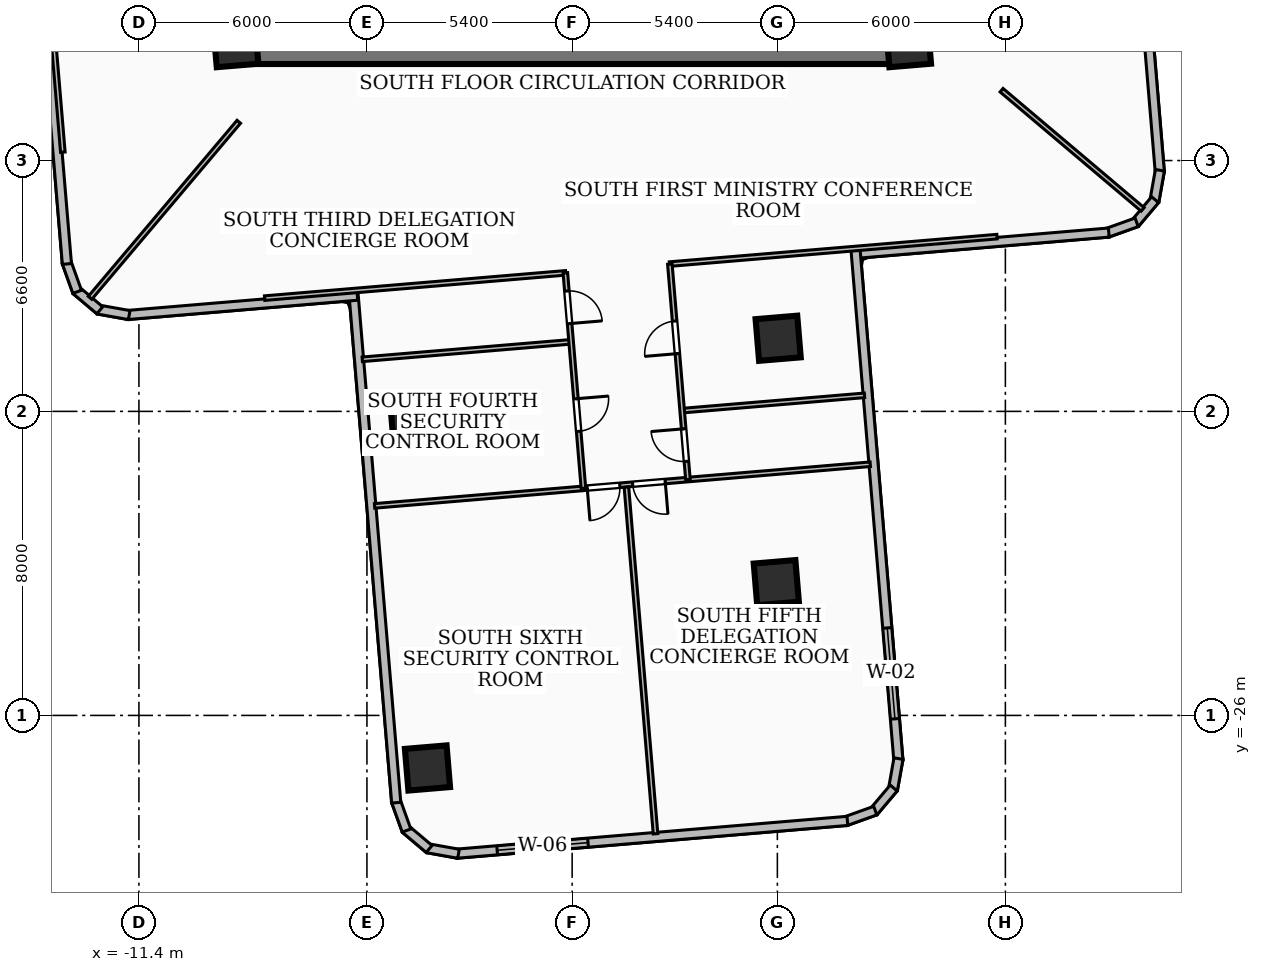
"""IFC4 building model, lengths in metres.
Left out: names, types, materials, properties, quantities, classifications, styles, units other than length and angle.
Written with IfcOpenShell. Run it as: python <this file> out.ifc"""

import sys

from ifc_helpers import new_model, si_unit, direction, frame, frame_2d, origin, origin_2d, place, context, subcontext, project, spatial, rectangle, extrude, element, fill, save


model = new_model("IFC4")
c1 = context("Model", 3, precision=1e-05, world=origin(), true_north=direction((0.0, 1.0)))
c2 = subcontext(c1, "Body", "Model", "MODEL_VIEW")
j1 = project(units=[si_unit("LENGTHUNIT", "METRE"), si_unit("PLANEANGLEUNIT", "RADIAN")], contexts=[c1])
p1 = place(None, origin())
s1 = spatial("IfcSite", under=j1, at=p1, CompositionType="ELEMENT")
p2 = place(p1, origin())
s2 = spatial("IfcBuilding", under=s1, at=p2, CompositionType="ELEMENT")
p3 = place(p2, frame((0.0, 0.0, 64.08)))
s3 = spatial("IfcBuildingStorey", under=s2, at=p3, CompositionType="ELEMENT", Elevation=64.08)
p4 = place(p3, frame((8.78, -8.585, 0.0), z_axis=(0.0, 0.0, 1.0), x_axis=(-1.0, 0.0, 0.0)))
e1 = element("IfcWall", 1, at=p4, inside=s3, PredefinedType="SHEAR", context=c2, shape_type="SweptSolid", body=[
    extrude(rectangle(XDim=17.56, YDim=0.55, at=frame_2d((8.78, 0.0))), origin(), (0.0, 0.0, 1.0), 3.34),
])
for number, where, z_axis, x_axis in (
    (2, (8.85, -8.35, 0.0), (0.0, 0.0, 1.0), (0.996, 0.084, 0.0)),
    (3, (-8.85, -8.35, 0.0), (0.0, 0.0, 1.0), (0.996, 0.084, 0.0)),
    (4, (-4.184, -18.391, 0.0), (0.0, 0.0, 1.0), (0.996, 0.084, 0.0)),
    (5, (5.421, -16.076, 0.0), (0.0, 0.0, 1.0), (0.996, 0.084, 0.0)),
    (6, (-3.807, -27.383, 0.0), (0.0, 0.0, 1.0), (0.996, 0.084, 0.0)),
    (7, (5.372, -22.507, 0.0), (0.0, 0.0, 1.0), (0.996, 0.084, 0.0)),
):
    element("IfcColumn", number, at=place(p3, frame(where, z_axis=z_axis, x_axis=x_axis)), inside=s3, PredefinedType="COLUMN", context=c2, shape_type="SweptSolid", body=[
        extrude(rectangle(XDim=1.1, YDim=1.1, at=origin_2d()), origin(), (0.0, 0.0, 1.0), 3.6),
    ])
p5 = place(p3, frame((14.956, -5.652, 0.0), z_axis=(0.0, 0.0, 1.0), x_axis=(0.083627472659, -0.996497087711, 0.0)))
e8 = element("IfcWall", 8, at=p5, inside=s3, PredefinedType="SOLIDWALL", context=c2, shape_type="SweptSolid", body=[
    extrude(rectangle(XDim=6.075, YDim=0.24, at=frame_2d((3.038, 0.0))), origin(), (0.0, 0.0, 1.0), 3.34),
])
p6 = place(p3, frame((15.466, -11.656, 0.0), z_axis=(0.0, 0.0, 1.0), x_axis=(-0.175678791378, -0.98444754165, 0.0)))
e9 = element("IfcWall", 9, at=p6, inside=s3, PredefinedType="SOLIDWALL", context=c2, shape_type="SweptSolid", body=[
    extrude(rectangle(XDim=0.831, YDim=0.24, at=frame_2d((0.416, 0.0))), origin(), (0.0, 0.0, 1.0), 3.34),
])
p7 = place(p3, frame((15.34, -12.43, 0.0), z_axis=(0.0, 0.0, 1.0), x_axis=(-0.645767595037, -0.763534028842, 0.0)))
e10 = element("IfcWall", 10, at=p7, inside=s3, PredefinedType="SOLIDWALL", context=c2, shape_type="SweptSolid", body=[
    extrude(rectangle(XDim=0.815, YDim=0.24, at=frame_2d((0.407, 0.0))), origin(), (0.0, 0.0, 1.0), 3.34),
])
p8 = place(p3, frame((14.854, -13.025, 0.0), z_axis=(0.0, 0.0, 1.0), x_axis=(-0.941455621898, -0.337136933599, 0.0)))
e11 = element("IfcWall", 11, at=p8, inside=s3, PredefinedType="SOLIDWALL", context=c2, shape_type="SweptSolid", body=[
    extrude(rectangle(XDim=0.831, YDim=0.24, at=frame_2d((0.415, 0.0))), origin(), (0.0, 0.0, 1.0), 3.34),
])
p9 = place(p3, frame((14.121, -13.295, 0.0), z_axis=(0.0, 0.0, 1.0), x_axis=(-0.99648986367, -0.083713509088, 0.0)))
e12 = element("IfcWall", 12, at=p9, inside=s3, PredefinedType="SOLIDWALL", context=c2, shape_type="SweptSolid", body=[
    extrude(rectangle(XDim=6.775, YDim=0.24, at=frame_2d((3.387, 0.0))), origin(), (0.0, 0.0, 1.0), 3.34),
])
p10 = place(p3, frame((7.458, -13.758, 0.0), z_axis=(0.0, 0.0, 1.0), x_axis=(0.083631732273, -0.996496730229, 0.0)))
e13 = element("IfcWall", 13, at=p10, inside=s3, PredefinedType="SOLIDWALL", context=c2, shape_type="SweptSolid", body=[
    extrude(rectangle(XDim=13.475, YDim=0.24, at=frame_2d((6.738, 0.0))), origin(), (0.0, 0.0, 1.0), 3.34),
])
p11 = place(p10, frame((9.975, 0.0, 0.85)))
e14 = element("IfcOpeningElement", 14, at=p11, cuts=e13, PredefinedType="OPENING", context=c2, shape_type="SweptSolid", body=[
    extrude(rectangle(XDim=2.4, YDim=2.1, at=frame_2d((1.2, 1.05))), frame((0.0, 0.13, 0.0), z_axis=(0.0, -1.0, 0.0), x_axis=(1.0, 0.0, 0.0)), (0.0, 0.0, 1.0), 0.26),
])
p12 = place(p3, frame((8.587, -27.136, 0.0), z_axis=(0.0, 0.0, 1.0), x_axis=(-0.175678791378, -0.98444754165, 0.0)))
e15 = element("IfcWall", 15, at=p12, inside=s3, PredefinedType="SOLIDWALL", context=c2, shape_type="SweptSolid", body=[
    extrude(rectangle(XDim=0.831, YDim=0.24, at=frame_2d((0.416, 0.0))), origin(), (0.0, 0.0, 1.0), 3.34),
])
p13 = place(p3, frame((8.461, -27.91, 0.0), z_axis=(0.0, 0.0, 1.0), x_axis=(-0.644892840611, -0.764273003664, 0.0)))
e16 = element("IfcWall", 16, at=p13, inside=s3, PredefinedType="SOLIDWALL", context=c2, shape_type="SweptSolid", body=[
    extrude(rectangle(XDim=0.814, YDim=0.24, at=frame_2d((0.407, 0.0))), origin(), (0.0, 0.0, 1.0), 3.34),
])
p14 = place(p3, frame((7.976, -28.505, 0.0), z_axis=(0.0, 0.0, 1.0), x_axis=(-0.941455621898, -0.337136933599, 0.0)))
e17 = element("IfcWall", 17, at=p14, inside=s3, PredefinedType="SOLIDWALL", context=c2, shape_type="SweptSolid", body=[
    extrude(rectangle(XDim=0.831, YDim=0.24, at=frame_2d((0.415, 0.0))), origin(), (0.0, 0.0, 1.0), 3.34),
])
p15 = place(p3, frame((7.243, -28.775, 0.0), z_axis=(0.0, 0.0, 1.0), x_axis=(-0.996496471002, -0.083634820983, 0.0)))
e18 = element("IfcWall", 18, at=p15, inside=s3, PredefinedType="SOLIDWALL", context=c2, shape_type="SweptSolid", body=[
    extrude(rectangle(XDim=10.319, YDim=0.24, at=frame_2d((5.16, 0.0))), origin(), (0.0, 0.0, 1.0), 3.34),
])
p16 = place(p15, frame((6.849, 0.0, 0.85)))
e19 = element("IfcOpeningElement", 19, at=p16, cuts=e18, PredefinedType="OPENING", context=c2, shape_type="SweptSolid", body=[
    extrude(rectangle(XDim=2.4, YDim=1.85, at=frame_2d((1.2, 0.925))), frame((0.0, 0.13, 0.0), z_axis=(0.0, -1.0, 0.0), x_axis=(1.0, 0.0, 0.0)), (0.0, 0.0, 1.0), 0.26),
])
p17 = place(p3, frame((-2.99, -29.64, 0.0), z_axis=(0.0, 0.0, 1.0), x_axis=(-0.98444754165, 0.175678791378, 0.0)))
e20 = element("IfcWall", 20, at=p17, inside=s3, PredefinedType="SOLIDWALL", context=c2, shape_type="SweptSolid", body=[
    extrude(rectangle(XDim=0.831, YDim=0.24, at=frame_2d((0.416, 0.0))), origin(), (0.0, 0.0, 1.0), 3.34),
])
p18 = place(p3, frame((-3.764, -29.514, 0.0), z_axis=(0.0, 0.0, 1.0), x_axis=(-0.763773335426, 0.645484540553, 0.0)))
e21 = element("IfcWall", 21, at=p18, inside=s3, PredefinedType="SOLIDWALL", context=c2, shape_type="SweptSolid", body=[
    extrude(rectangle(XDim=0.813, YDim=0.24, at=frame_2d((0.407, 0.0))), origin(), (0.0, 0.0, 1.0), 3.34),
])
p19 = place(p3, frame((-4.358, -29.029, 0.0), z_axis=(0.0, 0.0, 1.0), x_axis=(-0.338178397423, 0.941082021673, 0.0)))
e22 = element("IfcWall", 22, at=p19, inside=s3, PredefinedType="SOLIDWALL", context=c2, shape_type="SweptSolid", body=[
    extrude(rectangle(XDim=0.831, YDim=0.24, at=frame_2d((0.416, 0.0))), origin(), (0.0, 0.0, 1.0), 3.34),
])
p20 = place(p3, frame((-4.629, -28.296, 0.0), z_axis=(0.0, 0.0, 1.0), x_axis=(-0.083649723304, 0.996495220155, 0.0)))
e23 = element("IfcWall", 23, at=p20, inside=s3, PredefinedType="SOLIDWALL", context=c2, shape_type="SweptSolid", body=[
    extrude(rectangle(XDim=13.475, YDim=0.24, at=frame_2d((6.738, 0.0))), origin(), (0.0, 0.0, 1.0), 2.152),
])
p21 = place(p3, frame((-5.652, -14.956, 0.0), z_axis=(0.0, 0.0, 1.0), x_axis=(-0.996497087711, -0.083627472659, 0.0)))
e24 = element("IfcWall", 24, at=p21, inside=s3, PredefinedType="SOLIDWALL", context=c2, shape_type="SweptSolid", body=[
    extrude(rectangle(XDim=6.075, YDim=0.24, at=frame_2d((3.038, 0.0))), origin(), (0.0, 0.0, 1.0), 2.072),
])
p22 = place(p3, frame((-11.656, -15.466, 0.0), z_axis=(0.0, 0.0, 1.0), x_axis=(-0.98444754165, 0.175678791378, 0.0)))
e25 = element("IfcWall", 25, at=p22, inside=s3, PredefinedType="SOLIDWALL", context=c2, shape_type="SweptSolid", body=[
    extrude(rectangle(XDim=0.831, YDim=0.24, at=frame_2d((0.416, 0.0))), origin(), (0.0, 0.0, 1.0), 3.34),
])
p23 = place(p3, frame((-12.43, -15.34, 0.0), z_axis=(0.0, 0.0, 1.0), x_axis=(-0.763534028842, 0.645767595037, 0.0)))
e26 = element("IfcWall", 26, at=p23, inside=s3, PredefinedType="SOLIDWALL", context=c2, shape_type="SweptSolid", body=[
    extrude(rectangle(XDim=0.815, YDim=0.24, at=frame_2d((0.407, 0.0))), origin(), (0.0, 0.0, 1.0), 3.34),
])
p24 = place(p3, frame((-13.025, -14.854, 0.0), z_axis=(0.0, 0.0, 1.0), x_axis=(-0.337136933599, 0.941455621898, 0.0)))
e27 = element("IfcWall", 27, at=p24, inside=s3, PredefinedType="SOLIDWALL", context=c2, shape_type="SweptSolid", body=[
    extrude(rectangle(XDim=0.831, YDim=0.24, at=frame_2d((0.415, 0.0))), origin(), (0.0, 0.0, 1.0), 3.34),
])
p25 = place(p3, frame((-13.295, -14.121, 0.0), z_axis=(0.0, 0.0, 1.0), x_axis=(-0.083713509088, 0.99648986367, 0.0)))
e28 = element("IfcWall", 28, at=p25, inside=s3, PredefinedType="SOLIDWALL", context=c2, shape_type="SweptSolid", body=[
    extrude(rectangle(XDim=6.775, YDim=0.24, at=frame_2d((3.387, 0.0))), origin(), (0.0, 0.0, 1.0), 2.072),
])
p26 = place(p3, frame((-8.772, -10.38, 0.0), z_axis=(0.0, 0.0, 1.0), x_axis=(-0.645424146464, -0.763824371935, 0.0)))
e29 = element("IfcWall", 29, at=p26, inside=s3, PredefinedType="PARTITIONING", context=c2, shape_type="SweptSolid", body=[
    extrude(rectangle(XDim=6.064, YDim=0.12, at=frame_2d((3.032, 0.0))), origin(), (0.0, 0.0, 1.0), 2.072),
])
p27 = place(p3, frame((11.3, -9.549, 0.0), z_axis=(0.0, 0.0, 1.0), x_axis=(0.763780578352, -0.645475970221, 0.0)))
e30 = element("IfcWall", 30, at=p27, inside=s3, PredefinedType="PARTITIONING", context=c2, shape_type="SweptSolid", body=[
    extrude(rectangle(XDim=4.86, YDim=0.12, at=frame_2d((2.43, 0.0))), origin(), (0.0, 0.0, 1.0), 3.34),
])
p28 = place(p3, frame((-14.125, -2.561, 0.0), z_axis=(0.0, 0.0, 1.0), x_axis=(0.083580419953, -0.996501035323, 0.0)))
e31 = element("IfcWall", 31, at=p28, inside=s3, PredefinedType="PARTITIONING", context=c2, shape_type="SweptSolid", body=[
    extrude(rectangle(XDim=8.649, YDim=0.12, at=frame_2d((4.325, 0.0))), origin(), (0.0, 0.0, 1.0), 2.072),
])
p29 = place(p3, frame((2.561, -14.125, 0.0), z_axis=(0.0, 0.0, 1.0), x_axis=(0.996501035323, 0.083580419953, 0.0)))
e32 = element("IfcWall", 32, at=p29, inside=s3, PredefinedType="PARTITIONING", context=c2, shape_type="SweptSolid", body=[
    extrude(rectangle(XDim=8.649, YDim=0.12, at=frame_2d((4.325, 0.0))), origin(), (0.0, 0.0, 1.0), 2.152),
])
p30 = place(p3, frame((-8.091, -15.02, 0.0), z_axis=(0.0, 0.0, 1.0), x_axis=(0.99649495528, 0.083652878615, 0.0)))
e33 = element("IfcWall", 33, at=p30, inside=s3, PredefinedType="PARTITIONING", context=c2, shape_type="SweptSolid", body=[
    extrude(rectangle(XDim=7.95, YDim=0.12, at=frame_2d((3.975, 0.0))), origin(), (0.0, 0.0, 1.0), 2.072),
])
p31 = place(p3, frame((2.915, -17.979, 0.0), z_axis=(0.0, 0.0, 1.0), x_axis=(0.996494654035, 0.083656467047, 0.0)))
e34 = element("IfcWall", 34, at=p31, inside=s3, PredefinedType="PARTITIONING", context=c2, shape_type="SweptSolid", body=[
    extrude(rectangle(XDim=4.795, YDim=0.12, at=frame_2d((2.397, 0.0))), origin(), (0.0, 0.0, 1.0), 2.152),
])
p32 = place(p3, frame((-5.523, -16.63, 0.0), z_axis=(0.0, 0.0, 1.0), x_axis=(0.996505502233, 0.083527145401, 0.0)))
e35 = element("IfcWall", 35, at=p32, inside=s3, PredefinedType="PARTITIONING", context=c2, shape_type="SweptSolid", body=[
    extrude(rectangle(XDim=5.495, YDim=0.12, at=frame_2d((2.748, 0.0))), origin(), (0.0, 0.0, 1.0), 2.152),
])
p33 = place(p3, frame((3.047, -19.794, 0.0), z_axis=(0.0, 0.0, 1.0), x_axis=(-0.083670439538, 0.996493480936, 0.0)))
e36 = element("IfcWall", 36, at=p33, inside=s3, PredefinedType="PARTITIONING", context=c2, shape_type="SweptSolid", body=[
    extrude(rectangle(XDim=5.69, YDim=0.12, at=frame_2d((2.845, 0.0))), origin(), (0.0, 0.0, 1.0), 2.152),
])
p34 = place(p33, frame((3.325, 0.0, 0.0)))
e37 = element("IfcOpeningElement", 37, at=p34, cuts=e36, PredefinedType="OPENING", context=c2, shape_type="SweptSolid", body=[
    extrude(rectangle(XDim=0.86, YDim=2.04, at=frame_2d((0.43, 1.02))), frame((0.0, 0.07, 0.0), z_axis=(0.0, -1.0, 0.0), x_axis=(1.0, 0.0, 0.0)), (0.0, 0.0, 1.0), 0.14),
])
p35 = place(p33, frame((0.48, 0.0, 0.0)))
e38 = element("IfcOpeningElement", 38, at=p35, cuts=e36, PredefinedType="OPENING", context=c2, shape_type="SweptSolid", body=[
    extrude(rectangle(XDim=0.86, YDim=2.04, at=frame_2d((0.43, 1.02))), frame((0.0, 0.07, 0.0), z_axis=(0.0, -1.0, 0.0), x_axis=(1.0, 0.0, 0.0)), (0.0, 0.0, 1.0), 0.14),
])
p36 = place(p3, frame((-0.179, -14.355, 0.0), z_axis=(0.0, 0.0, 1.0), x_axis=(0.083670439538, -0.996493480936, 0.0)))
e39 = element("IfcWall", 39, at=p36, inside=s3, PredefinedType="PARTITIONING", context=c2, shape_type="SweptSolid", body=[
    extrude(rectangle(XDim=5.69, YDim=0.12, at=frame_2d((2.845, 0.0))), origin(), (0.0, 0.0, 1.0), 2.152),
])
p37 = place(p36, frame((0.48, 0.0, 0.0)))
e40 = element("IfcOpeningElement", 40, at=p37, cuts=e39, PredefinedType="OPENING", context=c2, shape_type="SweptSolid", body=[
    extrude(rectangle(XDim=0.86, YDim=2.04, at=frame_2d((0.43, 1.02))), frame((0.0, 0.07, 0.0), z_axis=(0.0, -1.0, 0.0), x_axis=(1.0, 0.0, 0.0)), (0.0, 0.0, 1.0), 0.14),
])
p38 = place(p36, frame((3.325, 0.0, 0.0)))
e41 = element("IfcOpeningElement", 41, at=p38, cuts=e39, PredefinedType="OPENING", context=c2, shape_type="SweptSolid", body=[
    extrude(rectangle(XDim=0.86, YDim=2.04, at=frame_2d((0.43, 1.02))), frame((0.0, 0.07, 0.0), z_axis=(0.0, -1.0, 0.0), x_axis=(1.0, 0.0, 0.0)), (0.0, 0.0, 1.0), 0.14),
])
p39 = place(p3, frame((1.428, -19.991, 0.0), z_axis=(0.0, 0.0, 1.0), x_axis=(0.0836810572, -0.996492589368, 0.0)))
e42 = element("IfcWall", 42, at=p39, inside=s3, PredefinedType="PARTITIONING", context=c2, shape_type="SweptSolid", body=[
    extrude(rectangle(XDim=9.155, YDim=0.12, at=frame_2d((4.578, 0.0))), origin(), (0.0, 0.0, 1.0), 2.152),
])
p40 = place(p3, frame((7.845, -19.391, 0.0), z_axis=(0.0, 0.0, 1.0), x_axis=(-0.996488930494, -0.083724616474, 0.0)))
e43 = element("IfcWall", 43, at=p40, inside=s3, PredefinedType="PARTITIONING", context=c2, shape_type="SweptSolid", body=[
    extrude(rectangle(XDim=13.09, YDim=0.12, at=frame_2d((6.545, 0.0))), origin(), (0.0, 0.0, 1.0), 2.152),
])
p41 = place(p40, frame((6.615, 0.0, 0.0)))
e44 = element("IfcOpeningElement", 44, at=p41, cuts=e43, PredefinedType="OPENING", context=c2, shape_type="SweptSolid", body=[
    extrude(rectangle(XDim=0.86, YDim=2.04, at=frame_2d((0.43, 1.02))), frame((0.0, 0.07, 0.0), z_axis=(0.0, -1.0, 0.0), x_axis=(1.0, 0.0, 0.0)), (0.0, 0.0, 1.0), 0.14),
])
p42 = place(p40, frame((5.415, 0.0, 0.0)))
e45 = element("IfcOpeningElement", 45, at=p42, cuts=e43, PredefinedType="OPENING", context=c2, shape_type="SweptSolid", body=[
    extrude(rectangle(XDim=0.86, YDim=2.04, at=frame_2d((0.43, 1.02))), frame((0.0, 0.07, 0.0), z_axis=(0.0, -1.0, 0.0), x_axis=(1.0, 0.0, 0.0)), (0.0, 0.0, 1.0), 0.14),
])
p43 = place(p11, origin())
e46 = element("IfcWindow", 46, at=p43, inside=s3, PartitioningType="SINGLE_PANEL", PredefinedType="WINDOW", context=c2, shape_type="SweptSolid", body=[
    extrude(rectangle(XDim=2.4, YDim=2.1, at=frame_2d((1.2, 1.05))), frame((0.0, 0.03, 0.0), z_axis=(0.0, -1.0, 0.0), x_axis=(1.0, 0.0, 0.0)), (0.0, 0.0, 1.0), 0.06),
])
fill(e14, e46)
p44 = place(p16, origin())
e47 = element("IfcWindow", 47, at=p44, inside=s3, PartitioningType="SINGLE_PANEL", PredefinedType="WINDOW", context=c2, shape_type="SweptSolid", body=[
    extrude(rectangle(XDim=2.4, YDim=1.85, at=frame_2d((1.2, 0.925))), frame((0.0, 0.03, 0.0), z_axis=(0.0, -1.0, 0.0), x_axis=(1.0, 0.0, 0.0)), (0.0, 0.0, 1.0), 0.06),
])
fill(e19, e47)
p45 = place(p34, origin())
e48 = element("IfcDoor", 48, at=p45, inside=s3, OperationType="SINGLE_SWING_LEFT", PredefinedType="DOOR", context=c2, shape_type="SweptSolid", body=[
    extrude(rectangle(XDim=0.86, YDim=2.04, at=frame_2d((0.43, 1.02))), frame((0.0, 0.025, 0.0), z_axis=(0.0, -1.0, 0.0), x_axis=(1.0, 0.0, 0.0)), (0.0, 0.0, 1.0), 0.05),
])
fill(e37, e48)
p46 = place(p35, origin())
e49 = element("IfcDoor", 49, at=p46, inside=s3, OperationType="SINGLE_SWING_RIGHT", PredefinedType="DOOR", context=c2, shape_type="SweptSolid", body=[
    extrude(rectangle(XDim=0.86, YDim=2.04, at=frame_2d((0.43, 1.02))), frame((0.0, 0.025, 0.0), z_axis=(0.0, -1.0, 0.0), x_axis=(1.0, 0.0, 0.0)), (0.0, 0.0, 1.0), 0.05),
])
fill(e38, e49)
p47 = place(p37, origin())
e50 = element("IfcDoor", 50, at=p47, inside=s3, OperationType="SINGLE_SWING_RIGHT", PredefinedType="DOOR", context=c2, shape_type="SweptSolid", body=[
    extrude(rectangle(XDim=0.86, YDim=2.04, at=frame_2d((0.43, 1.02))), frame((0.0, 0.025, 0.0), z_axis=(0.0, -1.0, 0.0), x_axis=(1.0, 0.0, 0.0)), (0.0, 0.0, 1.0), 0.05),
])
fill(e40, e50)
p48 = place(p38, origin())
e51 = element("IfcDoor", 51, at=p48, inside=s3, OperationType="SINGLE_SWING_LEFT", PredefinedType="DOOR", context=c2, shape_type="SweptSolid", body=[
    extrude(rectangle(XDim=0.86, YDim=2.04, at=frame_2d((0.43, 1.02))), frame((0.0, 0.025, 0.0), z_axis=(0.0, -1.0, 0.0), x_axis=(1.0, 0.0, 0.0)), (0.0, 0.0, 1.0), 0.05),
])
fill(e41, e51)
p49 = place(p41, origin())
e52 = element("IfcDoor", 52, at=p49, inside=s3, OperationType="SINGLE_SWING_RIGHT", PredefinedType="DOOR", context=c2, shape_type="SweptSolid", body=[
    extrude(rectangle(XDim=0.86, YDim=2.04, at=frame_2d((0.43, 1.02))), frame((0.0, 0.025, 0.0), z_axis=(0.0, -1.0, 0.0), x_axis=(1.0, 0.0, 0.0)), (0.0, 0.0, 1.0), 0.05),
])
fill(e44, e52)
p50 = place(p42, origin())
e53 = element("IfcDoor", 53, at=p50, inside=s3, OperationType="SINGLE_SWING_LEFT", PredefinedType="DOOR", context=c2, shape_type="SweptSolid", body=[
    extrude(rectangle(XDim=0.86, YDim=2.04, at=frame_2d((0.43, 1.02))), frame((0.0, 0.025, 0.0), z_axis=(0.0, -1.0, 0.0), x_axis=(1.0, 0.0, 0.0)), (0.0, 0.0, 1.0), 0.05),
])
fill(e45, e53)
save(model, sys.argv[1])
